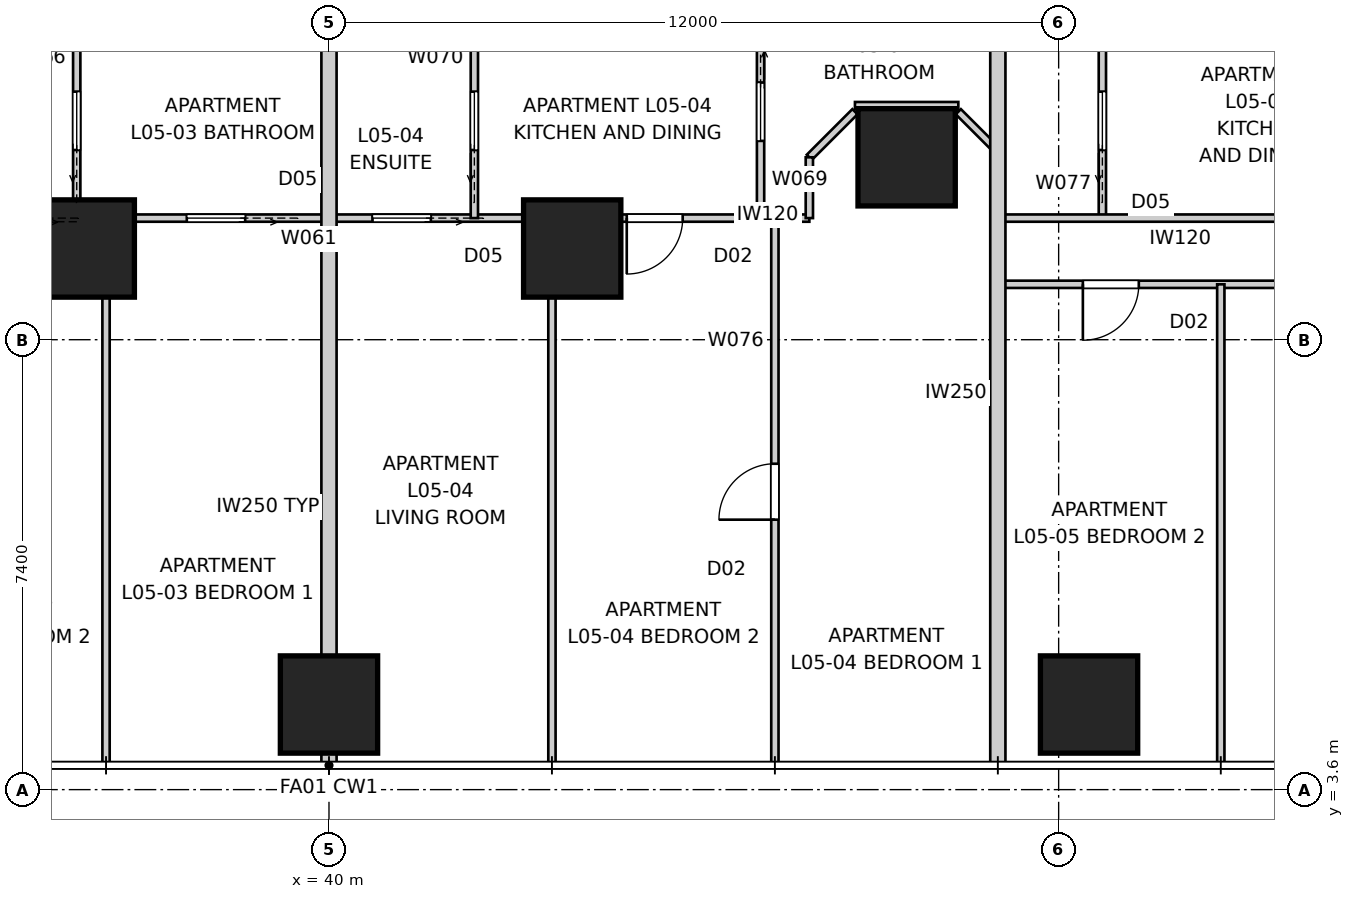
"""IFC4 building model, lengths in metres.
Left out: names, types, materials, properties, quantities, classifications, styles, units other than length and angle.
Written with IfcOpenShell. Run it as: python <this file> out.ifc"""

import sys

from ifc_helpers import new_model, si_unit, direction, frame, frame_2d, origin, origin_2d, place, context, subcontext, project, spatial, rectangle, extrude, element, fill, save


model = new_model("IFC4")
c1 = context("Model", 3, precision=1e-05, world=origin(), true_north=direction((0.0, 1.0)))
c2 = subcontext(c1, "Body", "Model", "MODEL_VIEW")
j1 = project(units=[si_unit("LENGTHUNIT", "METRE"), si_unit("PLANEANGLEUNIT", "RADIAN")], contexts=[c1])
p1 = place(None, origin())
s1 = spatial("IfcSite", under=j1, at=p1, CompositionType="ELEMENT")
p2 = place(p1, origin())
s2 = spatial("IfcBuilding", under=s1, at=p2, CompositionType="ELEMENT")
p3 = place(p2, frame((0.0, 0.0, 21.8)))
s3 = spatial("IfcBuildingStorey", under=s2, at=p3, CompositionType="ELEMENT", Elevation=21.8)
for number, where, z_axis, x_axis in (
    (1, (40.0, 5.0, 0.0), (0.0, 0.0, 1.0), (1.0, 0.0, 0.0)),
    (2, (52.5, 5.0, 0.0), (0.0, 0.0, 1.0), (1.0, 0.0, 0.0)),
    (3, (36.0, 12.5, 0.0), (0.0, 0.0, 1.0), (1.0, 0.0, 0.0)),
    (4, (44.0, 12.5, 0.0), (0.0, 0.0, 1.0), (1.0, 0.0, 0.0)),
    (5, (49.5, 14.0, 0.0), (0.0, 0.0, 1.0), (1.0, 0.0, 0.0)),
):
    element("IfcColumn", number, at=place(p3, frame(where, z_axis=z_axis, x_axis=x_axis)), inside=s3, PredefinedType="COLUMN", context=c2, shape_type="SweptSolid", body=[
        extrude(rectangle(XDim=1.6, YDim=1.6, at=origin_2d()), origin(), (0.0, 0.0, 1.0), 3.4),
    ])
p4 = place(p3, frame((40.0, 4.0, 0.0), z_axis=(0.0, 0.0, 1.0), x_axis=(0.0, 1.0, 0.0)))
e6 = element("IfcWall", 6, at=p4, inside=s3, PredefinedType="PARTITIONING", context=c2, shape_type="SweptSolid", body=[
    extrude(rectangle(XDim=8.5, YDim=0.25, at=frame_2d((4.25, 0.0))), origin(), (0.0, 0.0, 1.0), 3.25),
])
p5 = place(p3, frame((40.0, 12.5, 0.0), z_axis=(0.0, 0.0, 1.0), x_axis=(0.0, 1.0, 0.0)))
e7 = element("IfcWall", 7, at=p5, inside=s3, PredefinedType="PARTITIONING", context=c2, shape_type="SweptSolid", body=[
    extrude(rectangle(XDim=3.74, YDim=0.25, at=frame_2d((1.87, 0.0))), origin(), (0.0, 0.0, 1.0), 2.796),
])
p6 = place(p3, frame((51.0, 4.0, 0.0), z_axis=(0.0, 0.0, 1.0), x_axis=(0.0, 1.0, 0.0)))
e8 = element("IfcWall", 8, at=p6, inside=s3, PredefinedType="PARTITIONING", context=c2, shape_type="SweptSolid", body=[
    extrude(rectangle(XDim=12.24, YDim=0.25, at=frame_2d((6.12, 0.0))), origin(), (0.0, 0.0, 1.0), 3.25),
])
p7 = place(p3, frame((47.9, 13.0, 0.0), z_axis=(0.0, 0.0, 1.0), x_axis=(-1.0, 0.0, 0.0)))
e9 = element("IfcWall", 9, at=p7, inside=s3, PredefinedType="PARTITIONING", context=c2, shape_type="SweptSolid", body=[
    extrude(rectangle(XDim=15.8, YDim=0.12, at=frame_2d((7.9, 0.0))), origin(), (0.0, 0.0, 1.0), 2.549),
])
p8 = place(p7, frame((2.083, 0.0, 0.0)))
e10 = element("IfcOpeningElement", 10, at=p8, cuts=e9, PredefinedType="OPENING", context=c2, shape_type="SweptSolid", body=[
    extrude(rectangle(XDim=0.92, YDim=2.34, at=frame_2d((0.46, 1.17))), frame((0.0, 0.07, 0.0), z_axis=(0.0, -1.0, 0.0), x_axis=(1.0, 0.0, 0.0)), (0.0, 0.0, 1.0), 0.14),
])
p9 = place(p7, frame((6.225, 0.0, 0.0)))
e11 = element("IfcOpeningElement", 11, at=p9, cuts=e9, PredefinedType="OPENING", context=c2, shape_type="SweptSolid", body=[
    extrude(rectangle(XDim=0.96, YDim=2.1, at=frame_2d((0.48, 1.05))), frame((0.0, 0.07, 0.0), z_axis=(0.0, -1.0, 0.0), x_axis=(1.0, 0.0, 0.0)), (0.0, 0.0, 1.0), 0.14),
])
p10 = place(p7, frame((12.888, 0.0, 0.0)))
e12 = element("IfcOpeningElement", 12, at=p10, cuts=e9, PredefinedType="OPENING", context=c2, shape_type="SweptSolid", body=[
    extrude(rectangle(XDim=0.96, YDim=2.1, at=frame_2d((0.48, 1.05))), frame((0.0, 0.07, 0.0), z_axis=(0.0, -1.0, 0.0), x_axis=(1.0, 0.0, 0.0)), (0.0, 0.0, 1.0), 0.14),
])
p11 = place(p7, frame((9.278, 0.0, 0.0)))
e13 = element("IfcOpeningElement", 13, at=p11, cuts=e9, PredefinedType="OPENING", context=c2, shape_type="SweptSolid", body=[
    extrude(rectangle(XDim=0.96, YDim=2.1, at=frame_2d((0.48, 1.05))), frame((0.0, 0.07, 0.0), z_axis=(0.0, -1.0, 0.0), x_axis=(1.0, 0.0, 0.0)), (0.0, 0.0, 1.0), 0.14),
])
p12 = place(p3, frame((35.851, 13.0, 0.0), z_axis=(0.0, 0.0, 1.0), x_axis=(0.0, 1.0, 0.0)))
e14 = element("IfcWall", 14, at=p12, inside=s3, PredefinedType="PARTITIONING", context=c2, shape_type="SweptSolid", body=[
    extrude(rectangle(XDim=3.2, YDim=0.12, at=frame_2d((1.6, 0.0))), origin(), (0.0, 0.0, 1.0), 3.25),
])
p13 = place(p12, frame((1.12, 0.0, 0.0)))
e15 = element("IfcOpeningElement", 15, at=p13, cuts=e14, PredefinedType="OPENING", context=c2, shape_type="SweptSolid", body=[
    extrude(rectangle(XDim=0.96, YDim=2.1, at=frame_2d((0.48, 1.05))), frame((0.0, 0.07, 0.0), z_axis=(0.0, -1.0, 0.0), x_axis=(1.0, 0.0, 0.0)), (0.0, 0.0, 1.0), 0.14),
])
p14 = place(p3, frame((36.333, 4.04, 0.0), z_axis=(0.0, 0.0, 1.0), x_axis=(0.0, 1.0, 0.0)))
e16 = element("IfcWall", 16, at=p14, inside=s3, PredefinedType="PARTITIONING", context=c2, shape_type="SweptSolid", body=[
    extrude(rectangle(XDim=8.96, YDim=0.12, at=frame_2d((4.48, 0.0))), origin(), (0.0, 0.0, 1.0), 3.25),
])
p15 = place(p3, frame((47.098, 16.2, 0.0), z_axis=(0.0, 0.0, 1.0), x_axis=(0.0, -1.0, 0.0)))
e17 = element("IfcWall", 17, at=p15, inside=s3, PredefinedType="PARTITIONING", context=c2, shape_type="SweptSolid", body=[
    extrude(rectangle(XDim=3.2, YDim=0.12, at=frame_2d((1.6, 0.0))), origin(), (0.0, 0.0, 1.0), 3.25),
])
p16 = place(p15, frame((0.97, 0.0, 0.0)))
e18 = element("IfcOpeningElement", 18, at=p16, cuts=e17, PredefinedType="OPENING", context=c2, shape_type="SweptSolid", body=[
    extrude(rectangle(XDim=0.96, YDim=2.1, at=frame_2d((0.48, 1.05))), frame((0.0, 0.07, 0.0), z_axis=(0.0, -1.0, 0.0), x_axis=(1.0, 0.0, 0.0)), (0.0, 0.0, 1.0), 0.14),
])
p17 = place(p3, frame((42.391, 13.0, 0.0), z_axis=(0.0, 0.0, 1.0), x_axis=(0.0, 1.0, 0.0)))
e19 = element("IfcWall", 19, at=p17, inside=s3, PredefinedType="PARTITIONING", context=c2, shape_type="SweptSolid", body=[
    extrude(rectangle(XDim=3.2, YDim=0.12, at=frame_2d((1.6, 0.0))), origin(), (0.0, 0.0, 1.0), 3.25),
])
p18 = place(p17, frame((1.12, 0.0, 0.0)))
e20 = element("IfcOpeningElement", 20, at=p18, cuts=e19, PredefinedType="OPENING", context=c2, shape_type="SweptSolid", body=[
    extrude(rectangle(XDim=0.96, YDim=2.1, at=frame_2d((0.48, 1.05))), frame((0.0, 0.07, 0.0), z_axis=(0.0, -1.0, 0.0), x_axis=(1.0, 0.0, 0.0)), (0.0, 0.0, 1.0), 0.14),
])
p19 = place(p3, frame((51.0, 14.1, 0.0), z_axis=(0.0, 0.0, 1.0), x_axis=(-0.707106781187, 0.707106781187, 0.0)))
e21 = element("IfcWall", 21, at=p19, inside=s3, PredefinedType="PARTITIONING", context=c2, shape_type="SweptSolid", body=[
    extrude(rectangle(XDim=0.919, YDim=0.12, at=frame_2d((0.459, 0.0))), origin(), (0.0, 0.0, 1.0), 3.25),
])
p20 = place(p3, frame((50.35, 14.85, 0.0), z_axis=(0.0, 0.0, 1.0), x_axis=(-1.0, 0.0, 0.0)))
e22 = element("IfcWall", 22, at=p20, inside=s3, PredefinedType="PARTITIONING", context=c2, shape_type="SweptSolid", body=[
    extrude(rectangle(XDim=1.7, YDim=0.12, at=frame_2d((0.85, 0.0))), origin(), (0.0, 0.0, 1.0), 3.25),
])
p21 = place(p3, frame((48.65, 14.75, 0.0), z_axis=(0.0, 0.0, 1.0), x_axis=(-0.707106781187, -0.707106781187, 0.0)))
e23 = element("IfcWall", 23, at=p21, inside=s3, PredefinedType="PARTITIONING", context=c2, shape_type="SweptSolid", body=[
    extrude(rectangle(XDim=1.061, YDim=0.12, at=frame_2d((0.53, 0.0))), origin(), (0.0, 0.0, 1.0), 3.25),
])
p22 = place(p3, frame((47.9, 14.0, 0.0), z_axis=(0.0, 0.0, 1.0), x_axis=(0.0, -1.0, 0.0)))
e24 = element("IfcWall", 24, at=p22, inside=s3, PredefinedType="PARTITIONING", context=c2, shape_type="SweptSolid", body=[
    extrude(rectangle(XDim=1.0, YDim=0.12, at=frame_2d((0.5, 0.0))), origin(), (0.0, 0.0, 1.0), 3.25),
])
p23 = place(p3, frame((43.667, 13.0, 0.0), z_axis=(0.0, 0.0, 1.0), x_axis=(0.0, -1.0, 0.0)))
e25 = element("IfcWall", 25, at=p23, inside=s3, PredefinedType="PARTITIONING", context=c2, shape_type="SweptSolid", body=[
    extrude(rectangle(XDim=8.96, YDim=0.12, at=frame_2d((4.48, 0.0))), origin(), (0.0, 0.0, 1.0), 3.25),
])
p24 = place(p3, frame((47.333, 4.04, 0.0), z_axis=(0.0, 0.0, 1.0), x_axis=(0.0, 1.0, 0.0)))
e26 = element("IfcWall", 26, at=p24, inside=s3, PredefinedType="PARTITIONING", context=c2, shape_type="SweptSolid", body=[
    extrude(rectangle(XDim=8.96, YDim=0.12, at=frame_2d((4.48, 0.0))), origin(), (0.0, 0.0, 1.0), 3.25),
])
p25 = place(p24, frame((4.0, 0.0, 0.0)))
e27 = element("IfcOpeningElement", 27, at=p25, cuts=e26, PredefinedType="OPENING", context=c2, shape_type="SweptSolid", body=[
    extrude(rectangle(XDim=0.92, YDim=2.34, at=frame_2d((0.46, 1.17))), frame((0.0, 0.07, 0.0), z_axis=(0.0, -1.0, 0.0), x_axis=(1.0, 0.0, 0.0)), (0.0, 0.0, 1.0), 0.14),
])
p26 = place(p3, frame((52.719, 13.0, 0.0), z_axis=(0.0, 0.0, 1.0), x_axis=(0.0, 1.0, 0.0)))
e28 = element("IfcWall", 28, at=p26, inside=s3, PredefinedType="PARTITIONING", context=c2, shape_type="SweptSolid", body=[
    extrude(rectangle(XDim=3.2, YDim=0.12, at=frame_2d((1.6, 0.0))), origin(), (0.0, 0.0, 1.0), 3.25),
])
p27 = place(p26, frame((1.12, 0.0, 0.0)))
e29 = element("IfcOpeningElement", 29, at=p27, cuts=e28, PredefinedType="OPENING", context=c2, shape_type="SweptSolid", body=[
    extrude(rectangle(XDim=0.96, YDim=2.1, at=frame_2d((0.48, 1.05))), frame((0.0, 0.07, 0.0), z_axis=(0.0, -1.0, 0.0), x_axis=(1.0, 0.0, 0.0)), (0.0, 0.0, 1.0), 0.14),
])
p28 = place(p3, frame((57.0, 13.0, 0.0), z_axis=(0.0, 0.0, 1.0), x_axis=(-1.0, 0.0, 0.0)))
e30 = element("IfcWall", 30, at=p28, inside=s3, PredefinedType="PARTITIONING", context=c2, shape_type="SweptSolid", body=[
    extrude(rectangle(XDim=6.0, YDim=0.12, at=frame_2d((3.0, 0.0))), origin(), (0.0, 0.0, 1.0), 3.25),
])
p29 = place(p3, frame((65.96, 11.911, 0.0), z_axis=(0.0, 0.0, 1.0), x_axis=(-1.0, 0.0, 0.0)))
e31 = element("IfcWall", 31, at=p29, inside=s3, PredefinedType="PARTITIONING", context=c2, shape_type="SweptSolid", body=[
    extrude(rectangle(XDim=14.96, YDim=0.12, at=frame_2d((7.48, 0.0))), origin(), (0.0, 0.0, 1.0), 3.25),
])
p30 = place(p29, frame((7.742, 0.0, 0.0)))
e32 = element("IfcOpeningElement", 32, at=p30, cuts=e31, PredefinedType="OPENING", context=c2, shape_type="SweptSolid", body=[
    extrude(rectangle(XDim=0.92, YDim=2.34, at=frame_2d((0.46, 1.17))), frame((0.0, 0.07, 0.0), z_axis=(0.0, -1.0, 0.0), x_axis=(1.0, 0.0, 0.0)), (0.0, 0.0, 1.0), 0.14),
])
p31 = place(p29, frame((12.642, 0.0, 0.0)))
e33 = element("IfcOpeningElement", 33, at=p31, cuts=e31, PredefinedType="OPENING", context=c2, shape_type="SweptSolid", body=[
    extrude(rectangle(XDim=0.92, YDim=2.34, at=frame_2d((0.46, 1.17))), frame((0.0, 0.07, 0.0), z_axis=(0.0, -1.0, 0.0), x_axis=(1.0, 0.0, 0.0)), (0.0, 0.0, 1.0), 0.14),
])
p32 = place(p3, frame((54.667, 4.04, 0.0), z_axis=(0.0, 0.0, 1.0), x_axis=(0.0, 1.0, 0.0)))
e34 = element("IfcWall", 34, at=p32, inside=s3, PredefinedType="PARTITIONING", context=c2, shape_type="SweptSolid", body=[
    extrude(rectangle(XDim=7.871, YDim=0.12, at=frame_2d((3.936, 0.0))), origin(), (0.0, 0.0, 1.0), 2.638),
])
p33 = place(p8, origin())
e35 = element("IfcDoor", 35, at=p33, inside=s3, OperationType="SINGLE_SWING_RIGHT", PredefinedType="DOOR", context=c2, shape_type="SweptSolid", body=[
    extrude(rectangle(XDim=0.92, YDim=2.34, at=frame_2d((0.46, 1.17))), frame((0.0, 0.025, 0.0), z_axis=(0.0, -1.0, 0.0), x_axis=(1.0, 0.0, 0.0)), (0.0, 0.0, 1.0), 0.05),
])
fill(e10, e35)
p34 = place(p16, origin())
e36 = element("IfcDoor", 36, at=p34, inside=s3, OperationType="SLIDING_TO_LEFT", PredefinedType="DOOR", context=c2, shape_type="SweptSolid", body=[
    extrude(rectangle(XDim=0.96, YDim=2.1, at=frame_2d((0.48, 1.05))), frame((0.0, 0.025, 0.0), z_axis=(0.0, -1.0, 0.0), x_axis=(1.0, 0.0, 0.0)), (0.0, 0.0, 1.0), 0.05),
])
fill(e18, e36)
p35 = place(p18, origin())
e37 = element("IfcDoor", 37, at=p35, inside=s3, OperationType="SLIDING_TO_LEFT", PredefinedType="DOOR", context=c2, shape_type="SweptSolid", body=[
    extrude(rectangle(XDim=0.96, YDim=2.1, at=frame_2d((0.48, 1.05))), frame((0.0, 0.025, 0.0), z_axis=(0.0, -1.0, 0.0), x_axis=(1.0, 0.0, 0.0)), (0.0, 0.0, 1.0), 0.05),
])
fill(e20, e37)
p36 = place(p27, origin())
e38 = element("IfcDoor", 38, at=p36, inside=s3, OperationType="SLIDING_TO_LEFT", PredefinedType="DOOR", context=c2, shape_type="SweptSolid", body=[
    extrude(rectangle(XDim=0.96, YDim=2.1, at=frame_2d((0.48, 1.05))), frame((0.0, 0.025, 0.0), z_axis=(0.0, -1.0, 0.0), x_axis=(1.0, 0.0, 0.0)), (0.0, 0.0, 1.0), 0.05),
])
fill(e29, e38)
p37 = place(p9, origin())
e39 = element("IfcDoor", 39, at=p37, inside=s3, OperationType="SLIDING_TO_LEFT", PredefinedType="DOOR", context=c2, shape_type="SweptSolid", body=[
    extrude(rectangle(XDim=0.96, YDim=2.1, at=frame_2d((0.48, 1.05))), frame((0.0, 0.025, 0.0), z_axis=(0.0, -1.0, 0.0), x_axis=(1.0, 0.0, 0.0)), (0.0, 0.0, 1.0), 0.05),
])
fill(e11, e39)
p38 = place(p13, origin())
e40 = element("IfcDoor", 40, at=p38, inside=s3, OperationType="SLIDING_TO_LEFT", PredefinedType="DOOR", context=c2, shape_type="SweptSolid", body=[
    extrude(rectangle(XDim=0.96, YDim=2.1, at=frame_2d((0.48, 1.05))), frame((0.0, 0.025, 0.0), z_axis=(0.0, -1.0, 0.0), x_axis=(1.0, 0.0, 0.0)), (0.0, 0.0, 1.0), 0.05),
])
fill(e15, e40)
p39 = place(p31, origin())
e41 = element("IfcDoor", 41, at=p39, inside=s3, OperationType="SINGLE_SWING_RIGHT", PredefinedType="DOOR", context=c2, shape_type="SweptSolid", body=[
    extrude(rectangle(XDim=0.92, YDim=2.34, at=frame_2d((0.46, 1.17))), frame((0.0, 0.025, 0.0), z_axis=(0.0, -1.0, 0.0), x_axis=(1.0, 0.0, 0.0)), (0.0, 0.0, 1.0), 0.05),
])
fill(e33, e41)
p40 = place(p11, origin())
e42 = element("IfcDoor", 42, at=p40, inside=s3, OperationType="SLIDING_TO_LEFT", PredefinedType="DOOR", context=c2, shape_type="SweptSolid", body=[
    extrude(rectangle(XDim=0.96, YDim=2.1, at=frame_2d((0.48, 1.05))), frame((0.0, 0.025, 0.0), z_axis=(0.0, -1.0, 0.0), x_axis=(1.0, 0.0, 0.0)), (0.0, 0.0, 1.0), 0.05),
])
fill(e13, e42)
p41 = place(p25, origin())
e43 = element("IfcDoor", 43, at=p41, inside=s3, OperationType="SINGLE_SWING_LEFT", PredefinedType="DOOR", context=c2, shape_type="SweptSolid", body=[
    extrude(rectangle(XDim=0.92, YDim=2.34, at=frame_2d((0.46, 1.17))), frame((0.0, 0.025, 0.0), z_axis=(0.0, -1.0, 0.0), x_axis=(1.0, 0.0, 0.0)), (0.0, 0.0, 1.0), 0.05),
])
fill(e27, e43)
save(model, sys.argv[1])
